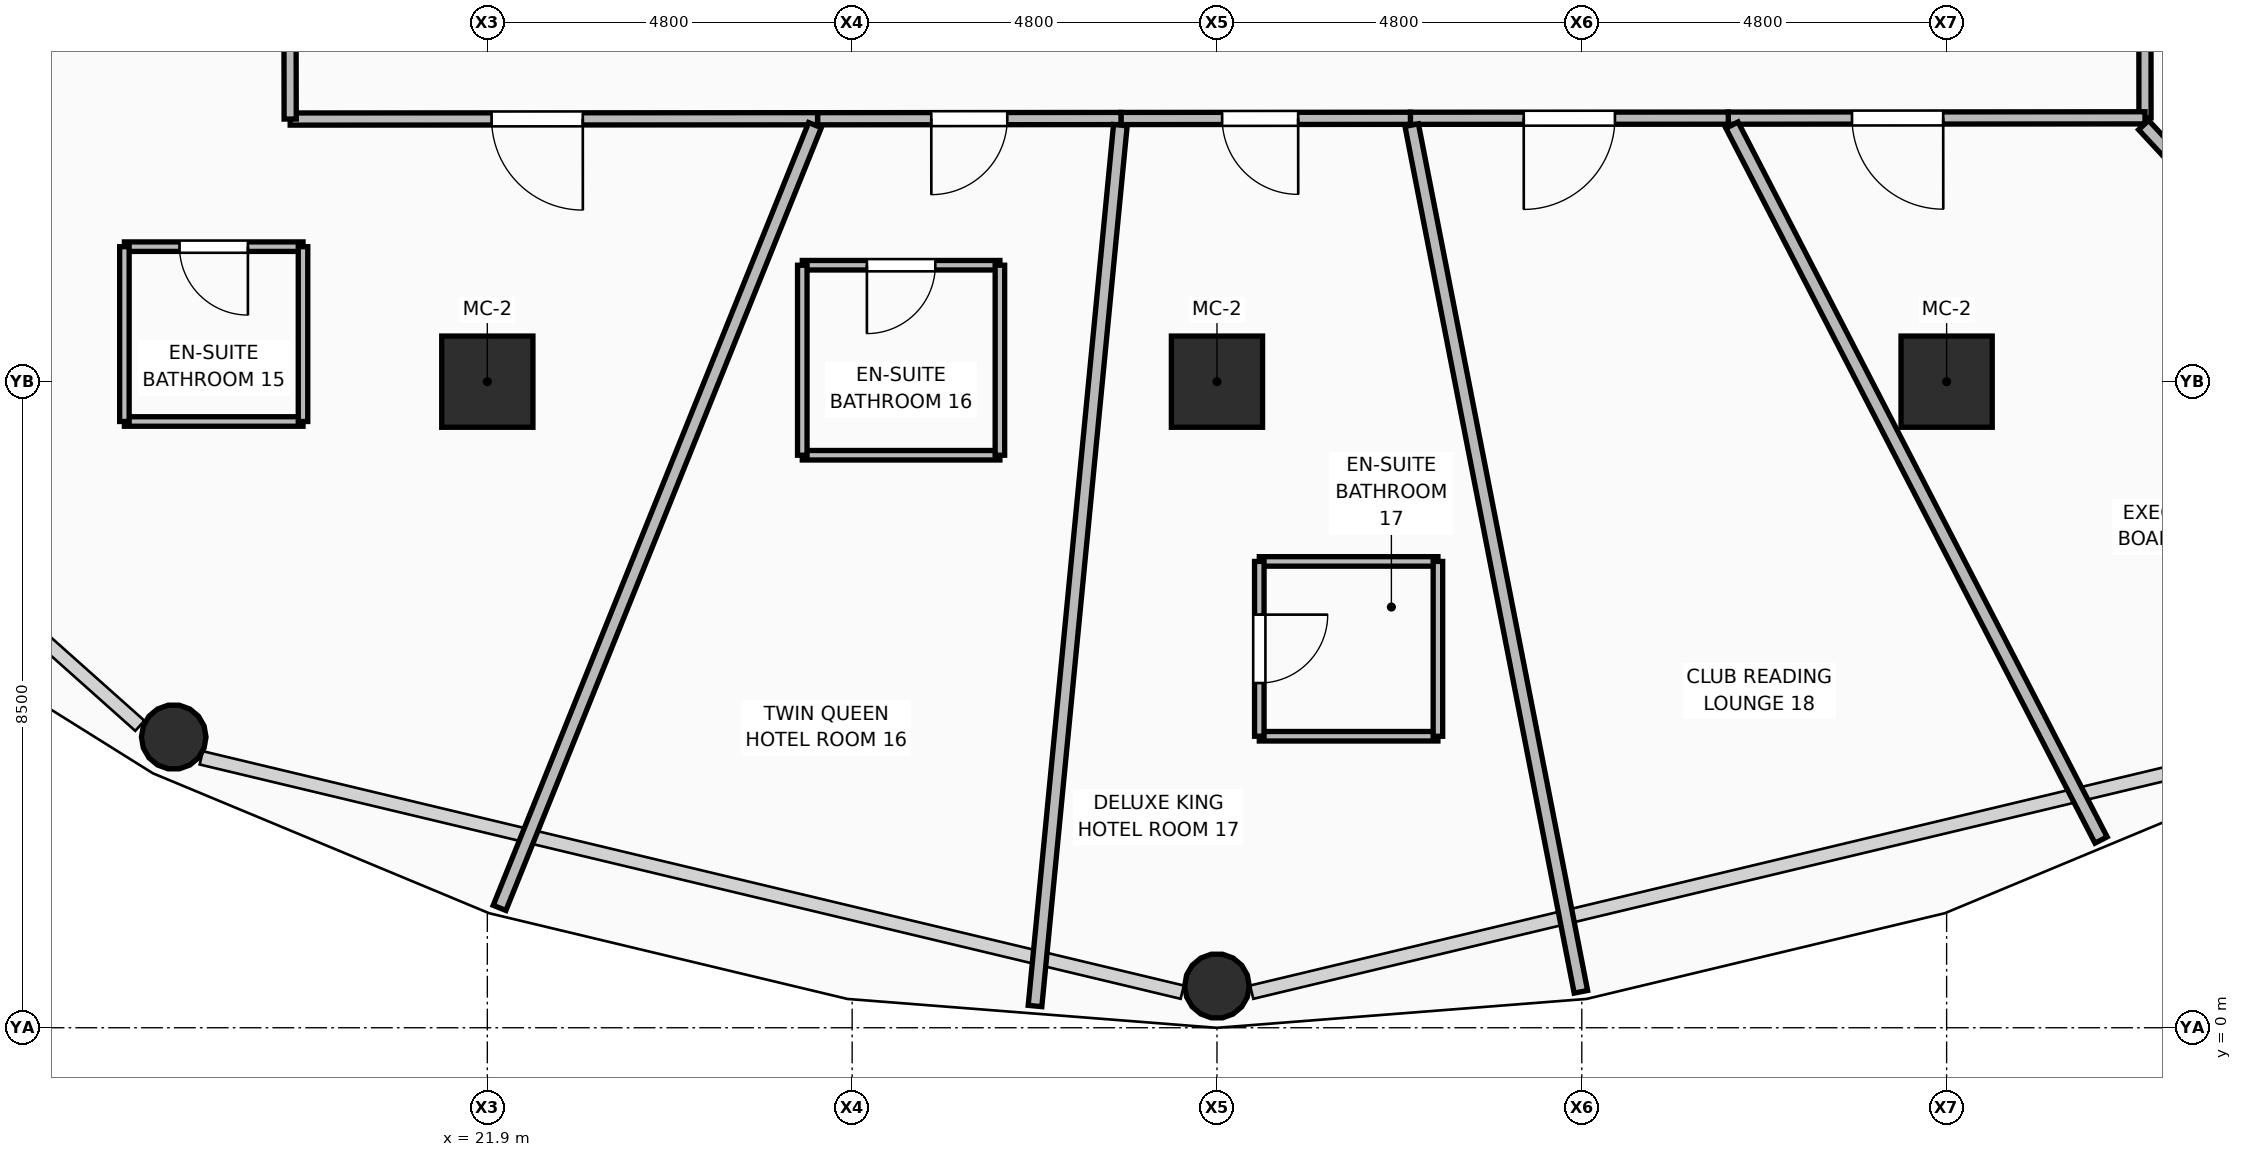
"""IFC4 building model, lengths in metres.
Left out: names, types, materials, properties, quantities, classifications, styles, units other than length and angle.
Written with IfcOpenShell. Run it as: python <this file> out.ifc"""

import sys

from ifc_helpers import new_model, si_unit, direction, frame, frame_2d, origin, origin_2d, place, context, subcontext, project, spatial, rectangle, hollow_rectangle, hollow_circle, extrude, element, fill, save


model = new_model("IFC4")
c1 = context("Model", 3, precision=1e-05, world=origin(), true_north=direction((0.0, 1.0)))
c2 = subcontext(c1, "Body", "Model", "MODEL_VIEW")
j1 = project(units=[si_unit("LENGTHUNIT", "METRE"), si_unit("PLANEANGLEUNIT", "RADIAN")], contexts=[c1])
p1 = place(None, origin())
s1 = spatial("IfcSite", under=j1, at=p1, CompositionType="ELEMENT")
p2 = place(p1, origin())
s2 = spatial("IfcBuilding", under=s1, at=p2, CompositionType="ELEMENT")
p3 = place(p2, frame((0.0, 0.0, 64.5)))
s3 = spatial("IfcBuildingStorey", under=s2, at=p3, CompositionType="ELEMENT", Elevation=64.5)
for number, where, z_axis, x_axis in (
    (1, (21.9, 8.5, 0.0), (0.0, 0.0, 1.0), (1.0, 0.0, 0.0)),
    (2, (31.5, 8.5, 0.0), (0.0, 0.0, 1.0), (1.0, 0.0, 0.0)),
    (3, (41.1, 8.5, 0.0), (0.0, 0.0, 1.0), (1.0, 0.0, 0.0)),
):
    element("IfcColumn", number, at=place(p3, frame(where, z_axis=z_axis, x_axis=x_axis)), inside=s3, PredefinedType="COLUMN", context=c2, shape_type="SweptSolid", body=[
        extrude(hollow_rectangle(XDim=1.2, YDim=1.2, WallThickness=0.045, at=origin_2d()), origin(), (0.0, 0.0, 1.0), 3.75),
    ])
p4 = place(p3, frame((17.774, 3.825, 0.0), z_axis=(-0.027659758927, -0.043094587365, 0.998688036514), x_axis=(0.841568257174, -0.540150783131, 0.0)))
e4 = element("IfcColumn", 4, at=p4, inside=s3, PredefinedType="COLUMN", context=c2, shape_type="SweptSolid", body=[
    extrude(hollow_circle(Radius=0.425, WallThickness=0.04, at=origin_2d()), origin(), (0.0, 0.0, 1.0), 3.575),
])
p5 = place(p3, frame((31.5, 0.549, 0.0), z_axis=(0.0, -0.04979113632, 0.998759652141), x_axis=(1.0, 0.0, 0.0)))
e5 = element("IfcColumn", 5, at=p5, inside=s3, PredefinedType="COLUMN", context=c2, shape_type="SweptSolid", body=[
    extrude(hollow_circle(Radius=0.425, WallThickness=0.04, at=origin_2d()), origin(), (0.0, 0.0, 1.0), 3.574),
])
p6 = place(p3, frame((43.707, 17.28, 0.0), z_axis=(0.0, 0.0, 1.0), x_axis=(0.000551825539, -0.999999847744, 0.0)))
e6 = element("IfcWall", 6, at=p6, inside=s3, PredefinedType="PARTITIONING", context=c2, shape_type="SweptSolid", body=[
    extrude(rectangle(XDim=5.309, YDim=0.16, at=frame_2d((2.655, 0.0))), origin(), (0.0, 0.0, 1.0), 2.928),
])
p7 = place(p6, frame((0.603, 0.0, 0.0)))
e7 = element("IfcOpeningElement", 7, at=p7, cuts=e6, PredefinedType="OPENING", context=c2, shape_type="SweptSolid", body=[
    extrude(rectangle(XDim=1.0, YDim=2.1, at=frame_2d((0.5, 1.05))), frame((0.0, 0.09, 0.0), z_axis=(0.0, -1.0, 0.0), x_axis=(1.0, 0.0, 0.0)), (0.0, 0.0, 1.0), 0.18),
])
p8 = place(p3, frame((43.71, 11.971, 0.0), z_axis=(0.0, 0.0, 1.0), x_axis=(-0.999999746124, -0.000712567736, 0.0)))
e8 = element("IfcWall", 8, at=p8, inside=s3, PredefinedType="PARTITIONING", context=c2, shape_type="SweptSolid", body=[
    extrude(rectangle(XDim=5.482, YDim=0.16, at=frame_2d((2.741, 0.0))), origin(), (0.0, 0.0, 1.0), 2.928),
])
p9 = place(p8, frame((2.655, 0.0, 0.0)))
e9 = element("IfcOpeningElement", 9, at=p9, cuts=e8, PredefinedType="OPENING", context=c2, shape_type="SweptSolid", body=[
    extrude(rectangle(XDim=1.2, YDim=2.1, at=frame_2d((0.6, 1.05))), frame((0.0, 0.09, 0.0), z_axis=(0.0, -1.0, 0.0), x_axis=(1.0, 0.0, 0.0)), (0.0, 0.0, 1.0), 0.18),
])
p10 = place(p3, frame((38.228, 11.967, 0.0), z_axis=(0.0, 0.0, 1.0), x_axis=(-0.999999890999, -0.000466907852, 0.0)))
e10 = element("IfcWall", 10, at=p10, inside=s3, PredefinedType="PARTITIONING", context=c2, shape_type="SweptSolid", body=[
    extrude(rectangle(XDim=4.183, YDim=0.16, at=frame_2d((2.092, 0.0))), origin(), (0.0, 0.0, 1.0), 3.55),
])
p11 = place(p10, frame((1.492, 0.0, 0.0)))
e11 = element("IfcOpeningElement", 11, at=p11, cuts=e10, PredefinedType="OPENING", context=c2, shape_type="SweptSolid", body=[
    extrude(rectangle(XDim=1.2, YDim=2.1, at=frame_2d((0.6, 1.05))), frame((0.0, 0.09, 0.0), z_axis=(0.0, -1.0, 0.0), x_axis=(1.0, 0.0, 0.0)), (0.0, 0.0, 1.0), 0.18),
])
p12 = place(p3, frame((34.045, 11.965, 0.0), z_axis=(0.0, 0.0, 1.0), x_axis=(-0.999999652644, -0.000833493331, 0.0)))
e12 = element("IfcWall", 12, at=p12, inside=s3, PredefinedType="PARTITIONING", context=c2, shape_type="SweptSolid", body=[
    extrude(rectangle(XDim=3.808, YDim=0.16, at=frame_2d((1.904, 0.0))), origin(), (0.0, 0.0, 1.0), 2.928),
])
p13 = place(p12, frame((1.477, 0.0, 0.0)))
e13 = element("IfcOpeningElement", 13, at=p13, cuts=e12, PredefinedType="OPENING", context=c2, shape_type="SweptSolid", body=[
    extrude(rectangle(XDim=1.0, YDim=2.1, at=frame_2d((0.5, 1.05))), frame((0.0, 0.09, 0.0), z_axis=(0.0, -1.0, 0.0), x_axis=(1.0, 0.0, 0.0)), (0.0, 0.0, 1.0), 0.18),
])
p14 = place(p3, frame((30.237, 11.962, 0.0), z_axis=(0.0, 0.0, 1.0), x_axis=(-0.999999730695, -0.00073389987, 0.0)))
e14 = element("IfcWall", 14, at=p14, inside=s3, PredefinedType="PARTITIONING", context=c2, shape_type="SweptSolid", body=[
    extrude(rectangle(XDim=3.992, YDim=0.16, at=frame_2d((1.996, 0.0))), origin(), (0.0, 0.0, 1.0), 3.55),
])
p15 = place(p14, frame((1.496, 0.0, 0.0)))
e15 = element("IfcOpeningElement", 15, at=p15, cuts=e14, PredefinedType="OPENING", context=c2, shape_type="SweptSolid", body=[
    extrude(rectangle(XDim=1.0, YDim=2.1, at=frame_2d((0.5, 1.05))), frame((0.0, 0.09, 0.0), z_axis=(0.0, -1.0, 0.0), x_axis=(1.0, 0.0, 0.0)), (0.0, 0.0, 1.0), 0.18),
])
p16 = place(p3, frame((26.245, 11.959, 0.0), z_axis=(0.0, 0.0, 1.0), x_axis=(-0.999999841558, -0.000562924303, 0.0)))
e16 = element("IfcWall", 16, at=p16, inside=s3, PredefinedType="PARTITIONING", context=c2, shape_type="SweptSolid", body=[
    extrude(rectangle(XDim=6.939, YDim=0.16, at=frame_2d((3.47, 0.0))), origin(), (0.0, 0.0, 1.0), 2.928),
])
p17 = place(p16, frame((3.089, 0.0, 0.0)))
e17 = element("IfcOpeningElement", 17, at=p17, cuts=e16, PredefinedType="OPENING", context=c2, shape_type="SweptSolid", body=[
    extrude(rectangle(XDim=1.2, YDim=2.1, at=frame_2d((0.6, 1.05))), frame((0.0, 0.09, 0.0), z_axis=(0.0, -1.0, 0.0), x_axis=(1.0, 0.0, 0.0)), (0.0, 0.0, 1.0), 0.18),
])
p18 = place(p3, frame((19.306, 11.955, 0.0), z_axis=(0.0, 0.0, 1.0), x_axis=(-0.001542811226, 0.999998809866, 0.0)))
e18 = element("IfcWall", 18, at=p18, inside=s3, PredefinedType="PARTITIONING", context=c2, shape_type="SweptSolid", body=[
    extrude(rectangle(XDim=3.798, YDim=0.16, at=frame_2d((1.899, 0.0))), origin(), (0.0, 0.0, 1.0), 3.55),
])
p19 = place(p3, frame((19.21, 15.685, 0.0), z_axis=(0.0, 0.0, 1.0), x_axis=(-0.796937326032, -0.604061998786, 0.0)))
e19 = element("IfcWall", 19, at=p19, inside=s3, PredefinedType="PARTITIONING", context=c2, shape_type="SweptSolid", body=[
    extrude(rectangle(XDim=11.249, YDim=0.18, at=frame_2d((5.625, 0.0))), origin(), (0.0, 0.0, 1.0), 2.775),
])
p20 = place(p3, frame((26.211, 11.875, 0.0), z_axis=(0.0, 0.0, 1.0), x_axis=(-0.373770341631, -0.9275212837, 0.0)))
e20 = element("IfcWall", 20, at=p20, inside=s3, PredefinedType="PARTITIONING", context=c2, shape_type="SweptSolid", body=[
    extrude(rectangle(XDim=11.103, YDim=0.18, at=frame_2d((5.551, 0.0))), origin(), (0.0, 0.0, 1.0), 2.775),
])
p21 = place(p3, frame((30.229, 11.875, 0.0), z_axis=(0.0, 0.0, 1.0), x_axis=(-0.09645352651, -0.995337489108, 0.0)))
e21 = element("IfcWall", 21, at=p21, inside=s3, PredefinedType="PARTITIONING", context=c2, shape_type="SweptSolid", body=[
    extrude(rectangle(XDim=11.643, YDim=0.18, at=frame_2d((5.822, 0.0))), origin(), (0.0, 0.0, 1.0), 2.775),
])
p22 = place(p3, frame((34.062, 11.875, 0.0), z_axis=(0.0, 0.0, 1.0), x_axis=(0.191616024107, -0.981469968621, 0.0)))
e22 = element("IfcWall", 22, at=p22, inside=s3, PredefinedType="PARTITIONING", context=c2, shape_type="SweptSolid", body=[
    extrude(rectangle(XDim=11.617, YDim=0.18, at=frame_2d((5.809, 0.0))), origin(), (0.0, 0.0, 1.0), 2.775),
])
p23 = place(p3, frame((38.276, 11.875, 0.0), z_axis=(0.0, 0.0, 1.0), x_axis=(0.458791558399, -0.888543924599, 0.0)))
e23 = element("IfcWall", 23, at=p23, inside=s3, PredefinedType="PARTITIONING", context=c2, shape_type="SweptSolid", body=[
    extrude(rectangle(XDim=10.585, YDim=0.18, at=frame_2d((5.292, 0.0))), origin(), (0.0, 0.0, 1.0), 2.775),
])
p24 = place(p3, frame((43.692, 11.876, 0.0), z_axis=(0.0, 0.0, 1.0), x_axis=(0.680668189446, -0.732591848082, 0.0)))
e24 = element("IfcWall", 24, at=p24, inside=s3, PredefinedType="PARTITIONING", context=c2, shape_type="SweptSolid", body=[
    extrude(rectangle(XDim=8.238, YDim=0.18, at=frame_2d((4.119, 0.0))), origin(), (0.0, 0.0, 1.0), 2.775),
])
p25 = place(p3, frame((43.79, 17.227, 0.0), z_axis=(0.0, 0.0, 1.0), x_axis=(0.845148426003, -0.534531699738, 0.0)))
e25 = element("IfcWall", 25, at=p25, inside=s3, PredefinedType="PARTITIONING", context=c2, shape_type="SweptSolid", body=[
    extrude(rectangle(XDim=12.291, YDim=0.18, at=frame_2d((6.146, 0.0))), origin(), (0.0, 0.0, 1.0), 2.775),
])
p26 = place(p3, frame((17.125, 7.976, 0.0), z_axis=(0.0, 0.0, 1.0), x_axis=(1.0, 0.0, 0.0)))
e26 = element("IfcWall", 26, at=p26, inside=s3, PredefinedType="PARTITIONING", context=c2, shape_type="SweptSolid", body=[
    extrude(rectangle(XDim=2.35, YDim=0.125, at=frame_2d((1.175, 0.0))), origin(), (0.0, 0.0, 1.0), 2.928),
])
p27 = place(p3, frame((17.125, 10.276, 0.0), z_axis=(0.0, 0.0, 1.0), x_axis=(1.0, 0.0, 0.0)))
e27 = element("IfcWall", 27, at=p27, inside=s3, PredefinedType="PARTITIONING", context=c2, shape_type="SweptSolid", body=[
    extrude(rectangle(XDim=2.35, YDim=0.125, at=frame_2d((1.175, 0.0))), origin(), (0.0, 0.0, 1.0), 2.928),
])
p28 = place(p27, frame((0.725, 0.0, 0.0)))
e28 = element("IfcOpeningElement", 28, at=p28, cuts=e27, PredefinedType="OPENING", context=c2, shape_type="SweptSolid", body=[
    extrude(rectangle(XDim=0.9, YDim=2.1, at=frame_2d((0.45, 1.05))), frame((0.0, 0.073, 0.0), z_axis=(0.0, -1.0, 0.0), x_axis=(1.0, 0.0, 0.0)), (0.0, 0.0, 1.0), 0.145),
])
p29 = place(p3, frame((17.125, 7.976, 0.0), z_axis=(0.0, 0.0, 1.0), x_axis=(0.0, 1.0, 0.0)))
e29 = element("IfcWall", 29, at=p29, inside=s3, PredefinedType="PARTITIONING", context=c2, shape_type="SweptSolid", body=[
    extrude(rectangle(XDim=2.3, YDim=0.125, at=frame_2d((1.15, 0.0))), origin(), (0.0, 0.0, 1.0), 3.55),
])
p30 = place(p3, frame((19.475, 7.976, 0.0), z_axis=(0.0, 0.0, 1.0), x_axis=(0.0, 1.0, 0.0)))
e30 = element("IfcWall", 30, at=p30, inside=s3, PredefinedType="PARTITIONING", context=c2, shape_type="SweptSolid", body=[
    extrude(rectangle(XDim=2.3, YDim=0.125, at=frame_2d((1.15, 0.0))), origin(), (0.0, 0.0, 1.0), 2.928),
])
p31 = place(p3, frame((26.044, 7.532, 0.0), z_axis=(0.0, 0.0, 1.0), x_axis=(1.0, 0.0, 0.0)))
e31 = element("IfcWall", 31, at=p31, inside=s3, PredefinedType="PARTITIONING", context=c2, shape_type="SweptSolid", body=[
    extrude(rectangle(XDim=2.6, YDim=0.125, at=frame_2d((1.3, 0.0))), origin(), (0.0, 0.0, 1.0), 3.55),
])
p32 = place(p3, frame((26.044, 10.032, 0.0), z_axis=(0.0, 0.0, 1.0), x_axis=(1.0, 0.0, 0.0)))
e32 = element("IfcWall", 32, at=p32, inside=s3, PredefinedType="PARTITIONING", context=c2, shape_type="SweptSolid", body=[
    extrude(rectangle(XDim=2.6, YDim=0.125, at=frame_2d((1.3, 0.0))), origin(), (0.0, 0.0, 1.0), 3.55),
])
p33 = place(p32, frame((0.85, 0.0, 0.0)))
e33 = element("IfcOpeningElement", 33, at=p33, cuts=e32, PredefinedType="OPENING", context=c2, shape_type="SweptSolid", body=[
    extrude(rectangle(XDim=0.9, YDim=2.1, at=frame_2d((0.45, 1.05))), frame((0.0, 0.073, 0.0), z_axis=(0.0, -1.0, 0.0), x_axis=(1.0, 0.0, 0.0)), (0.0, 0.0, 1.0), 0.145),
])
for number, where, z_axis, x_axis in (
    (34, (26.044, 7.532, 0.0), (0.0, 0.0, 1.0), (0.0, 1.0, 0.0)),
    (35, (28.644, 7.532, 0.0), (0.0, 0.0, 1.0), (0.0, 1.0, 0.0)),
):
    element("IfcWall", number, at=place(p3, frame(where, z_axis=z_axis, x_axis=x_axis)), inside=s3, PredefinedType="PARTITIONING", context=c2, shape_type="SweptSolid", body=[
        extrude(rectangle(XDim=2.5, YDim=0.125, at=frame_2d((1.25, 0.0))), origin(), (0.0, 0.0, 1.0), 3.55),
    ])
for number, where, z_axis, x_axis in (
    (36, (32.057, 3.835, 0.0), (0.0, 0.0, 1.0), (1.0, 0.0, 0.0)),
    (37, (32.057, 6.135, 0.0), (0.0, 0.0, 1.0), (1.0, 0.0, 0.0)),
):
    element("IfcWall", number, at=place(p3, frame(where, z_axis=z_axis, x_axis=x_axis)), inside=s3, PredefinedType="PARTITIONING", context=c2, shape_type="SweptSolid", body=[
        extrude(rectangle(XDim=2.35, YDim=0.125, at=frame_2d((1.175, 0.0))), origin(), (0.0, 0.0, 1.0), 3.55),
    ])
p34 = place(p3, frame((32.057, 3.835, 0.0), z_axis=(0.0, 0.0, 1.0), x_axis=(0.0, 1.0, 0.0)))
e38 = element("IfcWall", 38, at=p34, inside=s3, PredefinedType="PARTITIONING", context=c2, shape_type="SweptSolid", body=[
    extrude(rectangle(XDim=2.3, YDim=0.125, at=frame_2d((1.15, 0.0))), origin(), (0.0, 0.0, 1.0), 3.55),
])
p35 = place(p34, frame((0.7, 0.0, 0.0)))
e39 = element("IfcOpeningElement", 39, at=p35, cuts=e38, PredefinedType="OPENING", context=c2, shape_type="SweptSolid", body=[
    extrude(rectangle(XDim=0.9, YDim=2.1, at=frame_2d((0.45, 1.05))), frame((0.0, 0.073, 0.0), z_axis=(0.0, -1.0, 0.0), x_axis=(1.0, 0.0, 0.0)), (0.0, 0.0, 1.0), 0.145),
])
p36 = place(p3, frame((34.407, 3.835, 0.0), z_axis=(0.0, 0.0, 1.0), x_axis=(0.0, 1.0, 0.0)))
e40 = element("IfcWall", 40, at=p36, inside=s3, PredefinedType="PARTITIONING", context=c2, shape_type="SweptSolid", body=[
    extrude(rectangle(XDim=2.3, YDim=0.125, at=frame_2d((1.15, 0.0))), origin(), (0.0, 0.0, 1.0), 3.55),
])
p37 = place(p28, frame((0.9, 0.0, 0.0), z_axis=(0.0, 0.0, 1.0), x_axis=(-1.0, 0.0, 0.0)))
e41 = element("IfcDoor", 41, at=p37, inside=s3, OperationType="SINGLE_SWING_LEFT", PredefinedType="DOOR", context=c2, shape_type="SweptSolid", body=[
    extrude(rectangle(XDim=0.9, YDim=2.1, at=frame_2d((0.45, 1.05))), frame((0.0, 0.025, 0.0), z_axis=(0.0, -1.0, 0.0), x_axis=(1.0, 0.0, 0.0)), (0.0, 0.0, 1.0), 0.05),
])
fill(e28, e41)
p38 = place(p17, origin())
e42 = element("IfcDoor", 42, at=p38, inside=s3, OperationType="SINGLE_SWING_LEFT", PredefinedType="DOOR", context=c2, shape_type="SweptSolid", body=[
    extrude(rectangle(XDim=1.2, YDim=2.1, at=frame_2d((0.6, 1.05))), frame((0.0, 0.025, 0.0), z_axis=(0.0, -1.0, 0.0), x_axis=(1.0, 0.0, 0.0)), (0.0, 0.0, 1.0), 0.05),
])
fill(e17, e42)
p39 = place(p33, frame((0.9, 0.0, 0.0), z_axis=(0.0, 0.0, 1.0), x_axis=(-1.0, 0.0, 0.0)))
e43 = element("IfcDoor", 43, at=p39, inside=s3, OperationType="SINGLE_SWING_RIGHT", PredefinedType="DOOR", context=c2, shape_type="SweptSolid", body=[
    extrude(rectangle(XDim=0.9, YDim=2.1, at=frame_2d((0.45, 1.05))), frame((0.0, 0.025, 0.0), z_axis=(0.0, -1.0, 0.0), x_axis=(1.0, 0.0, 0.0)), (0.0, 0.0, 1.0), 0.05),
])
fill(e33, e43)
p40 = place(p15, origin())
e44 = element("IfcDoor", 44, at=p40, inside=s3, OperationType="SINGLE_SWING_RIGHT", PredefinedType="DOOR", context=c2, shape_type="SweptSolid", body=[
    extrude(rectangle(XDim=1.0, YDim=2.1, at=frame_2d((0.5, 1.05))), frame((0.0, 0.025, 0.0), z_axis=(0.0, -1.0, 0.0), x_axis=(1.0, 0.0, 0.0)), (0.0, 0.0, 1.0), 0.05),
])
fill(e15, e44)
p41 = place(p35, frame((0.9, 0.0, 0.0), z_axis=(0.0, 0.0, 1.0), x_axis=(-1.0, 0.0, 0.0)))
e45 = element("IfcDoor", 45, at=p41, inside=s3, OperationType="SINGLE_SWING_LEFT", PredefinedType="DOOR", context=c2, shape_type="SweptSolid", body=[
    extrude(rectangle(XDim=0.9, YDim=2.1, at=frame_2d((0.45, 1.05))), frame((0.0, 0.025, 0.0), z_axis=(0.0, -1.0, 0.0), x_axis=(1.0, 0.0, 0.0)), (0.0, 0.0, 1.0), 0.05),
])
fill(e39, e45)
p42 = place(p13, origin())
e46 = element("IfcDoor", 46, at=p42, inside=s3, OperationType="SINGLE_SWING_LEFT", PredefinedType="DOOR", context=c2, shape_type="SweptSolid", body=[
    extrude(rectangle(XDim=1.0, YDim=2.1, at=frame_2d((0.5, 1.05))), frame((0.0, 0.025, 0.0), z_axis=(0.0, -1.0, 0.0), x_axis=(1.0, 0.0, 0.0)), (0.0, 0.0, 1.0), 0.05),
])
fill(e13, e46)
p43 = place(p11, origin())
e47 = element("IfcDoor", 47, at=p43, inside=s3, OperationType="SINGLE_SWING_RIGHT", PredefinedType="DOOR", context=c2, shape_type="SweptSolid", body=[
    extrude(rectangle(XDim=1.2, YDim=2.1, at=frame_2d((0.6, 1.05))), frame((0.0, 0.025, 0.0), z_axis=(0.0, -1.0, 0.0), x_axis=(1.0, 0.0, 0.0)), (0.0, 0.0, 1.0), 0.05),
])
fill(e11, e47)
p44 = place(p9, origin())
e48 = element("IfcDoor", 48, at=p44, inside=s3, OperationType="SINGLE_SWING_LEFT", PredefinedType="DOOR", context=c2, shape_type="SweptSolid", body=[
    extrude(rectangle(XDim=1.2, YDim=2.1, at=frame_2d((0.6, 1.05))), frame((0.0, 0.025, 0.0), z_axis=(0.0, -1.0, 0.0), x_axis=(1.0, 0.0, 0.0)), (0.0, 0.0, 1.0), 0.05),
])
fill(e9, e48)
save(model, sys.argv[1])
